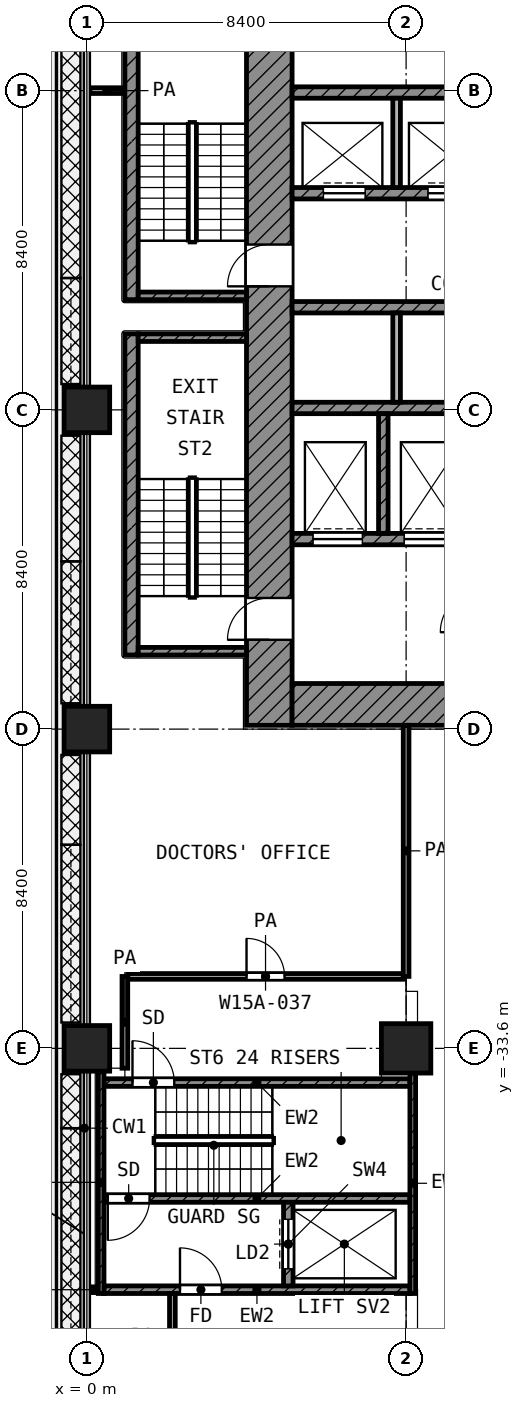
"""IFC4 building model, lengths in metres.
Left out: names, types, materials, properties, quantities, classifications, styles, units other than length and angle.
Written with IfcOpenShell. Run it as: python <this file> out.ifc"""

import sys

from ifc_helpers import new_model, si_unit, direction, frame, frame_2d, origin, origin_2d, place, context, subcontext, project, spatial, rectangle, extrude, element, fill, save


model = new_model("IFC4")
c1 = context("Model", 3, precision=1e-05, world=origin(), true_north=direction((0.0, 1.0)))
c2 = subcontext(c1, "Body", "Model", "MODEL_VIEW")
j1 = project(units=[si_unit("LENGTHUNIT", "METRE"), si_unit("PLANEANGLEUNIT", "RADIAN")], contexts=[c1])
p1 = place(None, origin())
s1 = spatial("IfcSite", under=j1, at=p1, CompositionType="ELEMENT")
p2 = place(p1, origin())
s2 = spatial("IfcBuilding", under=s1, at=p2, CompositionType="ELEMENT")
p3 = place(p2, frame((0.0, 0.0, 68.6)))
s3 = spatial("IfcBuildingStorey", under=s2, at=p3, CompositionType="ELEMENT", Elevation=68.6)
for number, where, z_axis, x_axis in (
    (1, (0.0, -16.8, 0.0), (0.0, 0.0, 1.0), (1.0, 0.0, 0.0)),
    (2, (0.0, -25.2, 0.0), (0.0, 0.0, 1.0), (1.0, 0.0, 0.0)),
    (3, (0.0, -33.6, 0.0), (0.0, 0.0, 1.0), (1.0, 0.0, 0.0)),
):
    element("IfcColumn", number, at=place(p3, frame(where, z_axis=z_axis, x_axis=x_axis)), inside=s3, PredefinedType="COLUMN", context=c2, shape_type="SweptSolid", body=[
        extrude(rectangle(XDim=1.2, YDim=1.2, at=origin_2d()), origin(), (0.0, 0.0, 1.0), 4.2),
    ])
p4 = place(p3, frame((8.4, -33.6, 0.0), z_axis=(0.0, 0.0, 1.0), x_axis=(1.0, 0.0, 0.0)))
e4 = element("IfcColumn", 4, at=p4, inside=s3, PredefinedType="COLUMN", context=c2, shape_type="SweptSolid", body=[
    extrude(rectangle(XDim=1.3, YDim=1.3, at=origin_2d()), origin(), (0.0, 0.0, 1.0), 4.2),
])
p5 = place(p3, frame((4.8, -25.1, 0.0), z_axis=(0.0, 0.0, 1.0), x_axis=(0.0, 1.0, 0.0)))
e5 = element("IfcWall", 5, at=p5, inside=s3, PredefinedType="SHEAR", context=c2, shape_type="SweptSolid", body=[
    extrude(rectangle(XDim=19.7, YDim=1.2, at=frame_2d((9.85, 0.0))), origin(), (0.0, 0.0, 1.0), 3.9),
])
p6 = place(p5, frame((11.55, 0.0, 0.0)))
e6 = element("IfcOpeningElement", 6, at=p6, cuts=e5, PredefinedType="OPENING", context=c2, shape_type="SweptSolid", body=[
    extrude(rectangle(XDim=1.1, YDim=2.1, at=frame_2d((0.55, 1.05))), frame((0.0, 0.61, 0.0), z_axis=(0.0, -1.0, 0.0), x_axis=(1.0, 0.0, 0.0)), (0.0, 0.0, 1.0), 1.22),
])
p7 = place(p5, frame((2.25, 0.0, 0.0)))
e7 = element("IfcOpeningElement", 7, at=p7, cuts=e5, PredefinedType="OPENING", context=c2, shape_type="SweptSolid", body=[
    extrude(rectangle(XDim=1.1, YDim=2.1, at=frame_2d((0.55, 1.05))), frame((0.0, 0.61, 0.0), z_axis=(0.0, -1.0, 0.0), x_axis=(1.0, 0.0, 0.0)), (0.0, 0.0, 1.0), 1.22),
])
p8 = place(p3, frame((5.4, -24.55, 0.0), z_axis=(0.0, 0.0, 1.0), x_axis=(1.0, 0.0, 0.0)))
e8 = element("IfcWall", 8, at=p8, inside=s3, PredefinedType="SHEAR", context=c2, shape_type="SweptSolid", body=[
    extrude(rectangle(XDim=18.6, YDim=1.1, at=frame_2d((9.3, 0.0))), origin(), (0.0, 0.0, 1.0), 3.9),
])
p9 = place(p8, frame((6.3, 0.0, 0.0)))
e9 = element("IfcOpeningElement", 9, at=p9, cuts=e8, PredefinedType="OPENING", context=c2, shape_type="SweptSolid", body=[
    extrude(rectangle(XDim=1.8, YDim=2.1, at=frame_2d((0.9, 1.05))), frame((0.0, 0.56, 0.0), z_axis=(0.0, -1.0, 0.0), x_axis=(1.0, 0.0, 0.0)), (0.0, 0.0, 1.0), 1.12),
])
p10 = place(p3, frame((5.4, -8.45, 0.0), z_axis=(0.0, 0.0, 1.0), x_axis=(1.0, 0.0, 0.0)))
e10 = element("IfcWall", 10, at=p10, inside=s3, PredefinedType="SHEAR", context=c2, shape_type="SweptSolid", body=[
    extrude(rectangle(XDim=16.65, YDim=0.3, at=frame_2d((8.325, 0.0))), origin(), (0.0, 0.0, 1.0), 3.9),
])
p11 = place(p3, frame((5.4, -11.1, 0.0), z_axis=(0.0, 0.0, 1.0), x_axis=(1.0, 0.0, 0.0)))
e11 = element("IfcWall", 11, at=p11, inside=s3, PredefinedType="SHEAR", context=c2, shape_type="SweptSolid", body=[
    extrude(rectangle(XDim=16.65, YDim=0.3, at=frame_2d((8.325, 0.0))), origin(), (0.0, 0.0, 1.0), 3.9),
])
p12 = place(p11, frame((0.825, 0.0, 0.0)))
e12 = element("IfcOpeningElement", 12, at=p12, cuts=e11, PredefinedType="OPENING", context=c2, shape_type="SweptSolid", body=[
    extrude(rectangle(XDim=1.1, YDim=2.1, at=frame_2d((0.55, 1.05))), frame((0.0, 0.16, 0.0), z_axis=(0.0, -1.0, 0.0), x_axis=(1.0, 0.0, 0.0)), (0.0, 0.0, 1.0), 0.32),
])
p13 = place(p11, frame((3.575, 0.0, 0.0)))
e13 = element("IfcOpeningElement", 13, at=p13, cuts=e11, PredefinedType="OPENING", context=c2, shape_type="SweptSolid", body=[
    extrude(rectangle(XDim=1.1, YDim=2.1, at=frame_2d((0.55, 1.05))), frame((0.0, 0.16, 0.0), z_axis=(0.0, -1.0, 0.0), x_axis=(1.0, 0.0, 0.0)), (0.0, 0.0, 1.0), 0.32),
])
p14 = place(p11, frame((6.325, 0.0, 0.0)))
e14 = element("IfcOpeningElement", 14, at=p14, cuts=e11, PredefinedType="OPENING", context=c2, shape_type="SweptSolid", body=[
    extrude(rectangle(XDim=1.1, YDim=2.1, at=frame_2d((0.55, 1.05))), frame((0.0, 0.16, 0.0), z_axis=(0.0, -1.0, 0.0), x_axis=(1.0, 0.0, 0.0)), (0.0, 0.0, 1.0), 0.32),
])
p15 = place(p11, frame((9.075, 0.0, 0.0)))
e15 = element("IfcOpeningElement", 15, at=p15, cuts=e11, PredefinedType="OPENING", context=c2, shape_type="SweptSolid", body=[
    extrude(rectangle(XDim=1.1, YDim=2.1, at=frame_2d((0.55, 1.05))), frame((0.0, 0.16, 0.0), z_axis=(0.0, -1.0, 0.0), x_axis=(1.0, 0.0, 0.0)), (0.0, 0.0, 1.0), 0.32),
])
for number, where, z_axis, x_axis in (
    (16, (5.4, -14.1, 0.0), (0.0, 0.0, 1.0), (1.0, 0.0, 0.0)),
    (17, (5.4, -16.75, 0.0), (0.0, 0.0, 1.0), (1.0, 0.0, 0.0)),
):
    element("IfcWall", number, at=place(p3, frame(where, z_axis=z_axis, x_axis=x_axis)), inside=s3, PredefinedType="SHEAR", context=c2, shape_type="SweptSolid", body=[
        extrude(rectangle(XDim=16.65, YDim=0.3, at=frame_2d((8.325, 0.0))), origin(), (0.0, 0.0, 1.0), 3.9),
    ])
p16 = place(p3, frame((5.4, -20.2, 0.0), z_axis=(0.0, 0.0, 1.0), x_axis=(1.0, 0.0, 0.0)))
e18 = element("IfcWall", 18, at=p16, inside=s3, PredefinedType="SHEAR", context=c2, shape_type="SweptSolid", body=[
    extrude(rectangle(XDim=14.65, YDim=0.3, at=frame_2d((7.325, 0.0))), origin(), (0.0, 0.0, 1.0), 3.9),
])
p17 = place(p16, frame((10.55, 0.0, 0.0)))
e19 = element("IfcOpeningElement", 19, at=p17, cuts=e18, PredefinedType="OPENING", context=c2, shape_type="SweptSolid", body=[
    extrude(rectangle(XDim=1.3, YDim=2.1, at=frame_2d((0.65, 1.05))), frame((0.0, 0.16, 0.0), z_axis=(0.0, -1.0, 0.0), x_axis=(1.0, 0.0, 0.0)), (0.0, 0.0, 1.0), 0.32),
])
p18 = place(p16, frame((12.95, 0.0, 0.0)))
e20 = element("IfcOpeningElement", 20, at=p18, cuts=e18, PredefinedType="OPENING", context=c2, shape_type="SweptSolid", body=[
    extrude(rectangle(XDim=1.3, YDim=2.1, at=frame_2d((0.65, 1.05))), frame((0.0, 0.16, 0.0), z_axis=(0.0, -1.0, 0.0), x_axis=(1.0, 0.0, 0.0)), (0.0, 0.0, 1.0), 0.32),
])
p19 = place(p16, frame((0.55, 0.0, 0.0)))
e21 = element("IfcOpeningElement", 21, at=p19, cuts=e18, PredefinedType="OPENING", context=c2, shape_type="SweptSolid", body=[
    extrude(rectangle(XDim=1.3, YDim=2.1, at=frame_2d((0.65, 1.05))), frame((0.0, 0.16, 0.0), z_axis=(0.0, -1.0, 0.0), x_axis=(1.0, 0.0, 0.0)), (0.0, 0.0, 1.0), 0.32),
])
p20 = place(p16, frame((2.95, 0.0, 0.0)))
e22 = element("IfcOpeningElement", 22, at=p20, cuts=e18, PredefinedType="OPENING", context=c2, shape_type="SweptSolid", body=[
    extrude(rectangle(XDim=1.3, YDim=2.1, at=frame_2d((0.65, 1.05))), frame((0.0, 0.16, 0.0), z_axis=(0.0, -1.0, 0.0), x_axis=(1.0, 0.0, 0.0)), (0.0, 0.0, 1.0), 0.32),
])
p21 = place(p16, frame((5.95, 0.0, 0.0)))
e23 = element("IfcOpeningElement", 23, at=p21, cuts=e18, PredefinedType="OPENING", context=c2, shape_type="SweptSolid", body=[
    extrude(rectangle(XDim=0.9, YDim=2.1, at=frame_2d((0.45, 1.05))), frame((0.0, 0.16, 0.0), z_axis=(0.0, -1.0, 0.0), x_axis=(1.0, 0.0, 0.0)), (0.0, 0.0, 1.0), 0.32),
])
p22 = place(p16, frame((8.35, 0.0, 0.0)))
e24 = element("IfcOpeningElement", 24, at=p22, cuts=e18, PredefinedType="OPENING", context=c2, shape_type="SweptSolid", body=[
    extrude(rectangle(XDim=0.9, YDim=2.1, at=frame_2d((0.45, 1.05))), frame((0.0, 0.16, 0.0), z_axis=(0.0, -1.0, 0.0), x_axis=(1.0, 0.0, 0.0)), (0.0, 0.0, 1.0), 0.32),
])
p23 = place(p3, frame((7.8, -20.05, 0.0), z_axis=(0.0, 0.0, 1.0), x_axis=(0.0, 1.0, 0.0)))
e25 = element("IfcWall", 25, at=p23, inside=s3, PredefinedType="SHEAR", context=c2, shape_type="SweptSolid", body=[
    extrude(rectangle(XDim=3.15, YDim=0.25, at=frame_2d((1.575, 0.0))), origin(), (0.0, 0.0, 1.0), 3.9),
])
p24 = place(p3, frame((8.15, -10.95, 0.0), z_axis=(0.0, 0.0, 1.0), x_axis=(0.0, 1.0, 0.0)))
e26 = element("IfcWall", 26, at=p24, inside=s3, PredefinedType="PARTITIONING", context=c2, shape_type="SweptSolid", body=[
    extrude(rectangle(XDim=2.35, YDim=0.2, at=frame_2d((1.175, 0.0))), origin(), (0.0, 0.0, 1.0), 3.9),
])
p25 = place(p3, frame((8.15, -16.6, 0.0), z_axis=(0.0, 0.0, 1.0), x_axis=(0.0, 1.0, 0.0)))
e27 = element("IfcWall", 27, at=p25, inside=s3, PredefinedType="PARTITIONING", context=c2, shape_type="SweptSolid", body=[
    extrude(rectangle(XDim=2.35, YDim=0.2, at=frame_2d((1.175, 0.0))), origin(), (0.0, 0.0, 1.0), 3.9),
])
p26 = place(p3, frame((1.175, -13.9, 0.0), z_axis=(0.0, 0.0, 1.0), x_axis=(0.0, 1.0, 0.0)))
e28 = element("IfcWall", 28, at=p26, inside=s3, PredefinedType="SHEAR", context=c2, shape_type="SweptSolid", body=[
    extrude(rectangle(XDim=8.45, YDim=0.35, at=frame_2d((4.225, 0.0))), origin(), (0.0, 0.0, 1.0), 3.9),
])
p27 = place(p3, frame((1.35, -13.8, 0.0), z_axis=(0.0, 0.0, 1.0), x_axis=(1.0, 0.0, 0.0)))
e29 = element("IfcWall", 29, at=p27, inside=s3, PredefinedType="SHEAR", context=c2, shape_type="SweptSolid", body=[
    extrude(rectangle(XDim=2.85, YDim=0.2, at=frame_2d((1.425, 0.0))), origin(), (0.0, 0.0, 1.0), 3.9),
])
p28 = place(p3, frame((1.175, -23.25, 0.0), z_axis=(0.0, 0.0, 1.0), x_axis=(0.0, 1.0, 0.0)))
e30 = element("IfcWall", 30, at=p28, inside=s3, PredefinedType="SHEAR", context=c2, shape_type="SweptSolid", body=[
    extrude(rectangle(XDim=8.45, YDim=0.35, at=frame_2d((4.225, 0.0))), origin(), (0.0, 0.0, 1.0), 3.9),
])
for number, where, z_axis, x_axis in (
    (31, (1.35, -14.9, 0.0), (0.0, 0.0, 1.0), (1.0, 0.0, 0.0)),
    (32, (1.35, -23.15, 0.0), (0.0, 0.0, 1.0), (1.0, 0.0, 0.0)),
):
    element("IfcWall", number, at=place(p3, frame(where, z_axis=z_axis, x_axis=x_axis)), inside=s3, PredefinedType="SHEAR", context=c2, shape_type="SweptSolid", body=[
        extrude(rectangle(XDim=2.85, YDim=0.2, at=frame_2d((1.425, 0.0))), origin(), (0.0, 0.0, 1.0), 3.9),
    ])
p29 = place(p3, frame((0.375, -40.05, 0.0), z_axis=(0.0, 0.0, 1.0), x_axis=(0.0, 1.0, 0.0)))
e33 = element("IfcWall", 33, at=p29, inside=s3, PredefinedType="SHEAR", context=c2, shape_type="SweptSolid", body=[
    extrude(rectangle(XDim=5.85, YDim=0.15, at=frame_2d((2.925, 0.0))), origin(), (0.0, 0.0, 1.0), 3.9),
])
p30 = place(p3, frame((8.575, -40.05, 0.0), z_axis=(0.0, 0.0, 1.0), x_axis=(0.0, 1.0, 0.0)))
e34 = element("IfcWall", 34, at=p30, inside=s3, PredefinedType="SHEAR", context=c2, shape_type="SweptSolid", body=[
    extrude(rectangle(XDim=5.8, YDim=0.15, at=frame_2d((2.9, 0.0))), origin(), (0.0, 0.0, 1.0), 3.9),
])
p31 = place(p3, frame((0.45, -34.5, 0.0), z_axis=(0.0, 0.0, 1.0), x_axis=(1.0, 0.0, 0.0)))
e35 = element("IfcWall", 35, at=p31, inside=s3, PredefinedType="SHEAR", context=c2, shape_type="SweptSolid", body=[
    extrude(rectangle(XDim=8.05, YDim=0.2, at=frame_2d((4.025, 0.0))), origin(), (0.0, 0.0, 1.0), 3.9),
])
p32 = place(p31, frame((0.75, 0.0, 0.0)))
e36 = element("IfcOpeningElement", 36, at=p32, cuts=e35, PredefinedType="OPENING", context=c2, shape_type="SweptSolid", body=[
    extrude(rectangle(XDim=1.1, YDim=2.1, at=frame_2d((0.55, 1.05))), frame((0.0, 0.11, 0.0), z_axis=(0.0, -1.0, 0.0), x_axis=(1.0, 0.0, 0.0)), (0.0, 0.0, 1.0), 0.22),
])
p33 = place(p3, frame((0.45, -37.55, 0.0), z_axis=(0.0, 0.0, 1.0), x_axis=(1.0, 0.0, 0.0)))
e37 = element("IfcWall", 37, at=p33, inside=s3, PredefinedType="SHEAR", context=c2, shape_type="SweptSolid", body=[
    extrude(rectangle(XDim=8.05, YDim=0.2, at=frame_2d((4.025, 0.0))), origin(), (0.0, 0.0, 1.0), 3.9),
])
p34 = place(p33, frame((0.1, 0.0, 0.0)))
e38 = element("IfcOpeningElement", 38, at=p34, cuts=e37, PredefinedType="OPENING", context=c2, shape_type="SweptSolid", body=[
    extrude(rectangle(XDim=1.1, YDim=2.1, at=frame_2d((0.55, 1.05))), frame((0.0, 0.11, 0.0), z_axis=(0.0, -1.0, 0.0), x_axis=(1.0, 0.0, 0.0)), (0.0, 0.0, 1.0), 0.22),
])
p35 = place(p3, frame((0.45, -39.95, 0.0), z_axis=(0.0, 0.0, 1.0), x_axis=(1.0, 0.0, 0.0)))
e39 = element("IfcWall", 39, at=p35, inside=s3, PredefinedType="SHEAR", context=c2, shape_type="SweptSolid", body=[
    extrude(rectangle(XDim=8.05, YDim=0.2, at=frame_2d((4.025, 0.0))), origin(), (0.0, 0.0, 1.0), 3.9),
])
p36 = place(p35, frame((2.0, 0.0, 0.0)))
e40 = element("IfcOpeningElement", 40, at=p36, cuts=e39, PredefinedType="OPENING", context=c2, shape_type="SweptSolid", body=[
    extrude(rectangle(XDim=1.1, YDim=2.1, at=frame_2d((0.55, 1.05))), frame((0.0, 0.11, 0.0), z_axis=(0.0, -1.0, 0.0), x_axis=(1.0, 0.0, 0.0)), (0.0, 0.0, 1.0), 0.22),
])
p37 = place(p3, frame((5.3, -39.85, 0.0), z_axis=(0.0, 0.0, 1.0), x_axis=(0.0, 1.0, 0.0)))
e41 = element("IfcWall", 41, at=p37, inside=s3, PredefinedType="SHEAR", context=c2, shape_type="SweptSolid", body=[
    extrude(rectangle(XDim=2.2, YDim=0.25, at=frame_2d((1.1, 0.0))), origin(), (0.0, 0.0, 1.0), 3.9),
])
p38 = place(p37, frame((0.45, 0.0, 0.0)))
e42 = element("IfcOpeningElement", 42, at=p38, cuts=e41, PredefinedType="OPENING", context=c2, shape_type="SweptSolid", body=[
    extrude(rectangle(XDim=1.3, YDim=2.1, at=frame_2d((0.65, 1.05))), frame((0.0, 0.135, 0.0), z_axis=(0.0, -1.0, 0.0), x_axis=(1.0, 0.0, 0.0)), (0.0, 0.0, 1.0), 0.27),
])
p39 = place(p3, frame((0.08, -39.95, 0.0), z_axis=(0.0, 0.0, 1.0), x_axis=(1.0, 0.0, 0.0)))
e43 = element("IfcWall", 43, at=p39, inside=s3, PredefinedType="PARTITIONING", context=c2, shape_type="SweptSolid", body=[
    extrude(rectangle(XDim=0.19, YDim=0.15, at=frame_2d((0.095, 0.0))), origin(), (0.0, 0.0, 1.0), 3.9),
])
p40 = place(p3, frame((1.077, -31.707, 0.0), z_axis=(0.0, 0.0, 1.0), x_axis=(1.0, 0.0, 0.0)))
e44 = element("IfcWall", 44, at=p40, inside=s3, PredefinedType="PARTITIONING", context=c2, shape_type="SweptSolid", body=[
    extrude(rectangle(XDim=7.248, YDim=0.15, at=frame_2d((3.624, 0.0))), origin(), (0.0, 0.0, 1.0), 3.9),
])
p41 = place(p40, frame((3.124, 0.0, 0.0)))
e45 = element("IfcOpeningElement", 45, at=p41, cuts=e44, PredefinedType="OPENING", context=c2, shape_type="SweptSolid", body=[
    extrude(rectangle(XDim=1.0, YDim=2.1, at=frame_2d((0.5, 1.05))), frame((0.0, 0.085, 0.0), z_axis=(0.0, -1.0, 0.0), x_axis=(1.0, 0.0, 0.0)), (0.0, 0.0, 1.0), 0.17),
])
p42 = place(p3, frame((0.08, -8.4, 0.0), z_axis=(0.0, 0.0, 1.0), x_axis=(1.0, 0.0, 0.0)))
e46 = element("IfcWall", 46, at=p42, inside=s3, PredefinedType="PARTITIONING", context=c2, shape_type="SweptSolid", body=[
    extrude(rectangle(XDim=0.89, YDim=0.15, at=frame_2d((0.445, 0.0))), origin(), (0.0, 0.0, 1.0), 3.9),
])
p43 = place(p3, frame((1.0, -34.123, 0.0), z_axis=(0.0, 0.0, 1.0), x_axis=(0.0, 1.0, 0.0)))
e47 = element("IfcWall", 47, at=p43, inside=s3, PredefinedType="PARTITIONING", context=c2, shape_type="SweptSolid", body=[
    extrude(rectangle(XDim=2.415, YDim=0.15, at=frame_2d((1.208, 0.0))), origin(), (0.0, 0.0, 1.0), 3.9),
])
p44 = place(p3, frame((2.25, -42.348, 0.0), z_axis=(0.0, 0.0, 1.0), x_axis=(0.0, 1.0, 0.0)))
e48 = element("IfcWall", 48, at=p44, inside=s3, PredefinedType="PARTITIONING", context=c2, shape_type="SweptSolid", body=[
    extrude(rectangle(XDim=2.298, YDim=0.15, at=frame_2d((1.149, 0.0))), origin(), (0.0, 0.0, 1.0), 3.9),
])
p45 = place(p3, frame((8.4, -31.707, 0.0), z_axis=(0.0, 0.0, 1.0), x_axis=(0.0, 1.0, 0.0)))
e49 = element("IfcWall", 49, at=p45, inside=s3, PredefinedType="PARTITIONING", context=c2, shape_type="SweptSolid", body=[
    extrude(rectangle(XDim=6.607, YDim=0.15, at=frame_2d((3.303, 0.0))), origin(), (0.0, 0.0, 1.0), 3.9),
])
p46 = place(p12, origin())
e50 = element("IfcDoor", 50, at=p46, inside=s3, OperationType="DOUBLE_DOOR_SLIDING", PredefinedType="DOOR", context=c2, shape_type="SweptSolid", body=[
    extrude(rectangle(XDim=1.1, YDim=2.1, at=frame_2d((0.55, 1.05))), frame((0.0, 0.025, 0.0), z_axis=(0.0, -1.0, 0.0), x_axis=(1.0, 0.0, 0.0)), (0.0, 0.0, 1.0), 0.05),
])
fill(e12, e50)
p47 = place(p13, origin())
e51 = element("IfcDoor", 51, at=p47, inside=s3, OperationType="DOUBLE_DOOR_SLIDING", PredefinedType="DOOR", context=c2, shape_type="SweptSolid", body=[
    extrude(rectangle(XDim=1.1, YDim=2.1, at=frame_2d((0.55, 1.05))), frame((0.0, 0.025, 0.0), z_axis=(0.0, -1.0, 0.0), x_axis=(1.0, 0.0, 0.0)), (0.0, 0.0, 1.0), 0.05),
])
fill(e13, e51)
p48 = place(p19, origin())
e52 = element("IfcDoor", 52, at=p48, inside=s3, OperationType="DOUBLE_DOOR_SLIDING", PredefinedType="DOOR", context=c2, shape_type="SweptSolid", body=[
    extrude(rectangle(XDim=1.3, YDim=2.1, at=frame_2d((0.65, 1.05))), frame((0.0, 0.025, 0.0), z_axis=(0.0, -1.0, 0.0), x_axis=(1.0, 0.0, 0.0)), (0.0, 0.0, 1.0), 0.05),
])
fill(e21, e52)
p49 = place(p20, origin())
e53 = element("IfcDoor", 53, at=p49, inside=s3, OperationType="DOUBLE_DOOR_SLIDING", PredefinedType="DOOR", context=c2, shape_type="SweptSolid", body=[
    extrude(rectangle(XDim=1.3, YDim=2.1, at=frame_2d((0.65, 1.05))), frame((0.0, 0.025, 0.0), z_axis=(0.0, -1.0, 0.0), x_axis=(1.0, 0.0, 0.0)), (0.0, 0.0, 1.0), 0.05),
])
fill(e22, e53)
p50 = place(p6, origin())
e54 = element("IfcDoor", 54, at=p50, inside=s3, OperationType="SINGLE_SWING_LEFT", PredefinedType="DOOR", context=c2, shape_type="SweptSolid", body=[
    extrude(rectangle(XDim=1.1, YDim=2.1, at=frame_2d((0.55, 1.05))), frame((0.0, 0.025, 0.0), z_axis=(0.0, -1.0, 0.0), x_axis=(1.0, 0.0, 0.0)), (0.0, 0.0, 1.0), 0.05),
])
fill(e6, e54)
p51 = place(p7, origin())
e55 = element("IfcDoor", 55, at=p51, inside=s3, OperationType="SINGLE_SWING_LEFT", PredefinedType="DOOR", context=c2, shape_type="SweptSolid", body=[
    extrude(rectangle(XDim=1.1, YDim=2.1, at=frame_2d((0.55, 1.05))), frame((0.0, 0.025, 0.0), z_axis=(0.0, -1.0, 0.0), x_axis=(1.0, 0.0, 0.0)), (0.0, 0.0, 1.0), 0.05),
])
fill(e7, e55)
p52 = place(p32, origin())
e56 = element("IfcDoor", 56, at=p52, inside=s3, OperationType="SINGLE_SWING_LEFT", PredefinedType="DOOR", context=c2, shape_type="SweptSolid", body=[
    extrude(rectangle(XDim=1.1, YDim=2.1, at=frame_2d((0.55, 1.05))), frame((0.0, 0.025, 0.0), z_axis=(0.0, -1.0, 0.0), x_axis=(1.0, 0.0, 0.0)), (0.0, 0.0, 1.0), 0.05),
])
fill(e36, e56)
p53 = place(p34, frame((1.1, 0.0, 0.0), z_axis=(0.0, 0.0, 1.0), x_axis=(-1.0, 0.0, 0.0)))
e57 = element("IfcDoor", 57, at=p53, inside=s3, OperationType="SINGLE_SWING_LEFT", PredefinedType="DOOR", context=c2, shape_type="SweptSolid", body=[
    extrude(rectangle(XDim=1.1, YDim=2.1, at=frame_2d((0.55, 1.05))), frame((0.0, 0.025, 0.0), z_axis=(0.0, -1.0, 0.0), x_axis=(1.0, 0.0, 0.0)), (0.0, 0.0, 1.0), 0.05),
])
fill(e38, e57)
p54 = place(p38, origin())
e58 = element("IfcDoor", 58, at=p54, inside=s3, OperationType="DOUBLE_DOOR_SLIDING", PredefinedType="DOOR", context=c2, shape_type="SweptSolid", body=[
    extrude(rectangle(XDim=1.3, YDim=2.1, at=frame_2d((0.65, 1.05))), frame((0.0, 0.025, 0.0), z_axis=(0.0, -1.0, 0.0), x_axis=(1.0, 0.0, 0.0)), (0.0, 0.0, 1.0), 0.05),
])
fill(e42, e58)
p55 = place(p36, origin())
e59 = element("IfcDoor", 59, at=p55, inside=s3, OperationType="SINGLE_SWING_LEFT", PredefinedType="DOOR", context=c2, shape_type="SweptSolid", body=[
    extrude(rectangle(XDim=1.1, YDim=2.1, at=frame_2d((0.55, 1.05))), frame((0.0, 0.025, 0.0), z_axis=(0.0, -1.0, 0.0), x_axis=(1.0, 0.0, 0.0)), (0.0, 0.0, 1.0), 0.05),
])
fill(e40, e59)
p56 = place(p41, origin())
e60 = element("IfcDoor", 60, at=p56, inside=s3, OperationType="SINGLE_SWING_LEFT", PredefinedType="DOOR", context=c2, shape_type="SweptSolid", body=[
    extrude(rectangle(XDim=1.0, YDim=2.1, at=frame_2d((0.5, 1.05))), frame((0.0, 0.025, 0.0), z_axis=(0.0, -1.0, 0.0), x_axis=(1.0, 0.0, 0.0)), (0.0, 0.0, 1.0), 0.05),
])
fill(e45, e60)
save(model, sys.argv[1])
